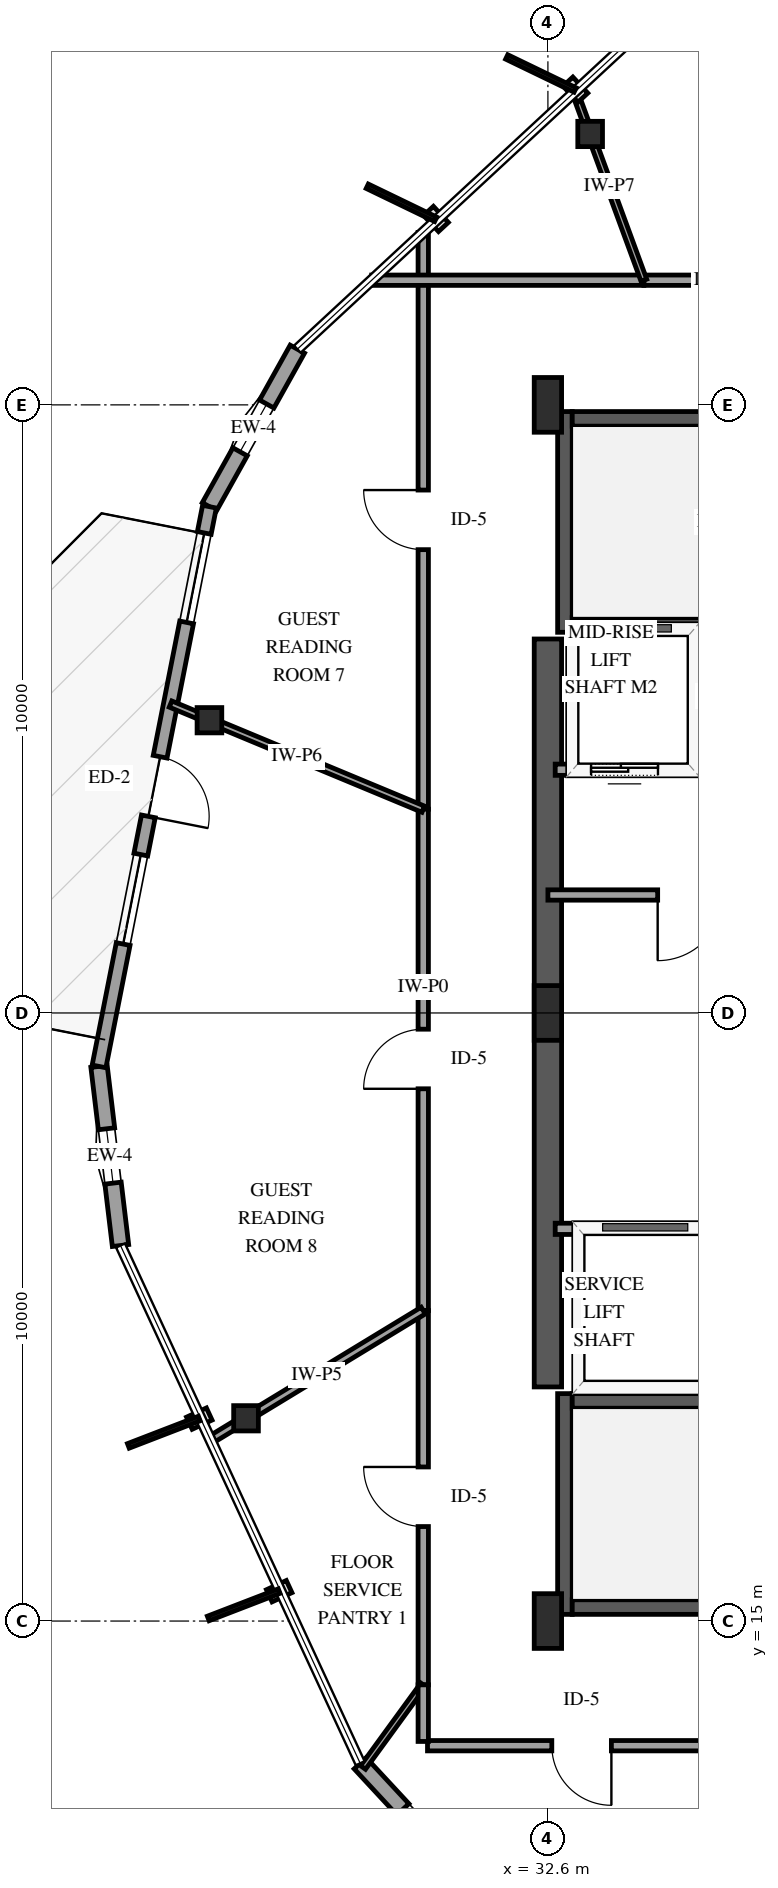
"""IFC4 building model, lengths in metres.
Left out: names, types, materials, properties, quantities, classifications, styles, units other than length and angle.
Written with IfcOpenShell. Run it as: python <this file> out.ifc"""

import sys

from ifc_helpers import new_model, si_unit, direction, frame, frame_2d, origin, origin_2d, place, context, subcontext, project, spatial, rectangle, i_section, extrude, element, fill, save


model = new_model("IFC4")
c1 = context("Model", 3, precision=1e-05, world=origin(), true_north=direction((0.0, 1.0)))
c2 = subcontext(c1, "Body", "Model", "MODEL_VIEW")
j1 = project(units=[si_unit("LENGTHUNIT", "METRE"), si_unit("PLANEANGLEUNIT", "RADIAN")], contexts=[c1])
p1 = place(None, origin())
s1 = spatial("IfcSite", under=j1, at=p1, CompositionType="ELEMENT")
p2 = place(p1, origin())
s2 = spatial("IfcBuilding", under=s1, at=p2, CompositionType="ELEMENT")
p3 = place(p2, frame((0.0, 0.0, 190.6)))
s3 = spatial("IfcBuildingStorey", under=s2, at=p3, CompositionType="ELEMENT", Elevation=190.6)
p4 = place(p3, frame((32.88, 15.11, 0.0), z_axis=(0.0, 0.0, 1.0), x_axis=(0.0, 1.0, 0.0)))
e1 = element("IfcWall", 1, at=p4, inside=s3, PredefinedType="SHEAR", context=c2, shape_type="SweptSolid", body=[
    extrude(rectangle(XDim=3.63, YDim=0.24, at=frame_2d((1.815, 0.0))), origin(), (0.0, 0.0, 1.0), 3.6),
])
for number, where, z_axis, x_axis in (
    (2, (33.0, 15.23, 0.0), (0.0, 0.0, 1.0), (1.0, 0.0, 0.0)),
    (3, (33.0, 18.62, 0.0), (0.0, 0.0, 1.0), (1.0, 0.0, 0.0)),
):
    element("IfcWall", number, at=place(p3, frame(where, z_axis=z_axis, x_axis=x_axis)), inside=s3, PredefinedType="SHEAR", context=c2, shape_type="SweptSolid", body=[
        extrude(rectangle(XDim=8.0, YDim=0.24, at=frame_2d((4.0, 0.0))), origin(), (0.0, 0.0, 1.0), 3.6),
    ])
p5 = place(p3, frame((32.88, 31.26, 0.0), z_axis=(0.0, 0.0, 1.0), x_axis=(0.0, 1.0, 0.0)))
e4 = element("IfcWall", 4, at=p5, inside=s3, PredefinedType="SHEAR", context=c2, shape_type="SweptSolid", body=[
    extrude(rectangle(XDim=3.63, YDim=0.24, at=frame_2d((1.815, 0.0))), origin(), (0.0, 0.0, 1.0), 3.6),
])
for number, where, z_axis, x_axis in (
    (5, (33.0, 31.38, 0.0), (0.0, 0.0, 1.0), (1.0, 0.0, 0.0)),
    (6, (33.0, 34.77, 0.0), (0.0, 0.0, 1.0), (1.0, 0.0, 0.0)),
):
    element("IfcWall", number, at=place(p3, frame(where, z_axis=z_axis, x_axis=x_axis)), inside=s3, PredefinedType="SHEAR", context=c2, shape_type="SweptSolid", body=[
        extrude(rectangle(XDim=8.0, YDim=0.24, at=frame_2d((4.0, 0.0))), origin(), (0.0, 0.0, 1.0), 3.6),
    ])
p6 = place(p3, frame((32.6, 18.85, 0.0), z_axis=(0.0, 0.0, 1.0), x_axis=(0.0, 1.0, 0.0)))
e7 = element("IfcWall", 7, at=p6, inside=s3, PredefinedType="SHEAR", context=c2, shape_type="SweptSolid", body=[
    extrude(rectangle(XDim=12.3, YDim=0.45, at=frame_2d((6.15, 0.0))), origin(), (0.0, 0.0, 1.0), 3.6),
])
for number, where, z_axis, x_axis in (
    (8, (32.6, 15.0, -0.3), (0.0, 0.0, 1.0), (1.0, 0.0, 0.0)),
    (9, (32.6, 25.0, -0.3), (0.0, 0.0, 1.0), (1.0, 0.0, 0.0)),
    (10, (32.6, 35.0, -0.3), (0.0, 0.0, 1.0), (1.0, 0.0, 0.0)),
):
    element("IfcColumn", number, at=place(p3, frame(where, z_axis=z_axis, x_axis=x_axis)), inside=s3, PredefinedType="PILASTER", context=c2, shape_type="SweptSolid", body=[
        extrude(rectangle(XDim=0.45, YDim=0.9, at=origin_2d()), origin(), (0.0, 0.0, 1.0), 3.9),
    ])
for number, where, z_axis, x_axis in (
    (11, (33.295, 39.455, -0.3), (0.0, 0.0, 1.0), (1.0, 0.0, 0.0)),
    (12, (27.034, 29.814, -0.3), (0.0, 0.0, 1.0), (1.0, 0.0, 0.0)),
    (13, (27.635, 18.334, -0.3), (0.0, 0.0, 1.0), (1.0, 0.0, 0.0)),
):
    element("IfcColumn", number, at=place(p3, frame(where, z_axis=z_axis, x_axis=x_axis)), inside=s3, PredefinedType="COLUMN", context=c2, shape_type="SweptSolid", body=[
        extrude(i_section(OverallWidth=0.406, OverallDepth=0.416, WebThickness=0.03, FlangeThickness=0.048, FilletRadius=0.038, at=origin_2d()), origin(), (0.0, 0.0, 1.0), 3.9),
    ])
p7 = place(p3, frame((28.479, 35.917, 0.0), z_axis=(0.0, 0.0, 1.0), x_axis=(-0.48724212473, -0.87326691904, 0.0)))
e14 = element("IfcWall", 14, at=p7, inside=s3, PredefinedType="SOLIDWALL", context=c2, shape_type="SweptSolid", body=[
    extrude(rectangle(XDim=2.967, YDim=0.27, at=frame_2d((1.483, 0.0))), origin(), (0.0, 0.0, 1.0), 2.679),
])
p8 = place(p7, frame((1.033, 0.0, 0.75)))
e15 = element("IfcOpeningElement", 15, at=p8, cuts=e14, PredefinedType="OPENING", context=c2, shape_type="SweptSolid", body=[
    extrude(rectangle(XDim=0.9, YDim=1.5, at=frame_2d((0.45, 0.75))), frame((0.0, 0.145, 0.0), z_axis=(0.0, -1.0, 0.0), x_axis=(1.0, 0.0, 0.0)), (0.0, 0.0, 1.0), 0.29),
])
p9 = place(p3, frame((25.218, 24.121, 0.0), z_axis=(0.0, 0.0, 1.0), x_axis=(0.119080319242, -0.9928846245, 0.0)))
e16 = element("IfcWall", 16, at=p9, inside=s3, PredefinedType="SOLIDWALL", context=c2, shape_type="SweptSolid", body=[
    extrude(rectangle(XDim=2.967, YDim=0.27, at=frame_2d((1.483, 0.0))), origin(), (0.0, 0.0, 1.0), 2.679),
])
p10 = place(p9, frame((1.033, 0.0, 0.75)))
e17 = element("IfcOpeningElement", 17, at=p10, cuts=e16, PredefinedType="OPENING", context=c2, shape_type="SweptSolid", body=[
    extrude(rectangle(XDim=0.9, YDim=1.5, at=frame_2d((0.45, 0.75))), frame((0.0, 0.145, 0.0), z_axis=(0.0, -1.0, 0.0), x_axis=(1.0, 0.0, 0.0)), (0.0, 0.0, 1.0), 0.29),
])
p11 = place(p3, frame((27.034, 33.326, 0.0), z_axis=(0.0, 0.0, 1.0), x_axis=(-0.193553277769, -0.981089765855, 0.0)))
e18 = element("IfcWall", 18, at=p11, inside=s3, PredefinedType="SOLIDWALL", context=c2, shape_type="SweptSolid", body=[
    extrude(rectangle(XDim=9.382, YDim=0.23, at=frame_2d((4.691, 0.0))), origin(), (0.0, 0.0, 1.0), 2.679),
])
p12 = place(p11, frame((4.191, 0.0, 0.0)))
e19 = element("IfcOpeningElement", 19, at=p12, cuts=e18, PredefinedType="OPENING", context=c2, shape_type="SweptSolid", body=[
    extrude(rectangle(XDim=1.0, YDim=2.15, at=frame_2d((0.5, 1.075))), frame((0.0, 0.125, 0.0), z_axis=(0.0, -1.0, 0.0), x_axis=(1.0, 0.0, 0.0)), (0.0, 0.0, 1.0), 0.25),
])
p13 = place(p11, frame((0.44, 0.0, 0.72)))
e20 = element("IfcOpeningElement", 20, at=p13, cuts=e18, PredefinedType="OPENING", context=c2, shape_type="SweptSolid", body=[
    extrude(rectangle(XDim=1.5, YDim=1.7, at=frame_2d((0.75, 0.85))), frame((0.0, 0.125, 0.0), z_axis=(0.0, -1.0, 0.0), x_axis=(1.0, 0.0, 0.0)), (0.0, 0.0, 1.0), 0.25),
])
p14 = place(p11, frame((5.831, 0.0, 0.72)))
e21 = element("IfcOpeningElement", 21, at=p14, cuts=e18, PredefinedType="OPENING", context=c2, shape_type="SweptSolid", body=[
    extrude(rectangle(XDim=1.5, YDim=1.7, at=frame_2d((0.75, 0.85))), frame((0.0, 0.125, 0.0), z_axis=(0.0, -1.0, 0.0), x_axis=(1.0, 0.0, 0.0)), (0.0, 0.0, 1.0), 0.25),
])
p15 = place(p3, frame((29.513, 12.661, 0.0), z_axis=(0.0, 0.0, 1.0), x_axis=(0.679939563614, -0.733268156838, 0.0)))
e22 = element("IfcWall", 22, at=p15, inside=s3, PredefinedType="SOLIDWALL", context=c2, shape_type="SweptSolid", body=[
    extrude(rectangle(XDim=2.967, YDim=0.27, at=frame_2d((1.483, 0.0))), origin(), (0.0, 0.0, 1.0), 2.679),
])
p16 = place(p15, frame((1.033, 0.0, 0.75)))
e23 = element("IfcOpeningElement", 23, at=p16, cuts=e22, PredefinedType="OPENING", context=c2, shape_type="SweptSolid", body=[
    extrude(rectangle(XDim=0.9, YDim=1.5, at=frame_2d((0.45, 0.75))), frame((0.0, 0.145, 0.0), z_axis=(0.0, -1.0, 0.0), x_axis=(1.0, 0.0, 0.0)), (0.0, 0.0, 1.0), 0.29),
])
p17 = place(p3, frame((32.72, 21.45, 0.0), z_axis=(0.0, 0.0, 1.0), x_axis=(1.0, 0.0, 0.0)))
e24 = element("IfcWall", 24, at=p17, inside=s3, PredefinedType="SOLIDWALL", context=c2, shape_type="SweptSolid", body=[
    extrude(rectangle(XDim=2.58, YDim=0.185, at=frame_2d((1.29, 0.0))), origin(), (0.0, 0.0, 1.0), 3.3),
])
p18 = place(p3, frame((32.72, 29.0, 0.0), z_axis=(0.0, 0.0, 1.0), x_axis=(1.0, 0.0, 0.0)))
e25 = element("IfcWall", 25, at=p18, inside=s3, PredefinedType="SOLIDWALL", context=c2, shape_type="SweptSolid", body=[
    extrude(rectangle(XDim=2.28, YDim=0.185, at=frame_2d((1.14, 0.0))), origin(), (0.0, 0.0, 1.0), 3.3),
])
p19 = place(p18, frame((0.59, 0.0, 0.0)))
e26 = element("IfcOpeningElement", 26, at=p19, cuts=e25, PredefinedType="OPENING", context=c2, shape_type="SweptSolid", body=[
    extrude(rectangle(XDim=1.1, YDim=2.15, at=frame_2d((0.55, 1.075))), frame((0.0, 0.103, 0.0), z_axis=(0.0, -1.0, 0.0), x_axis=(1.0, 0.0, 0.0)), (0.0, 0.0, 1.0), 0.205),
])
p20 = place(p3, frame((35.0, 29.11, 0.0), z_axis=(0.0, 0.0, 1.0), x_axis=(0.0, 1.0, 0.0)))
e27 = element("IfcWall", 27, at=p20, inside=s3, PredefinedType="SOLIDWALL", context=c2, shape_type="SweptSolid", body=[
    extrude(rectangle(XDim=2.1, YDim=0.185, at=frame_2d((1.05, 0.0))), origin(), (0.0, 0.0, 1.0), 3.3),
])
p21 = place(p3, frame((30.55, 28.351, 0.0), z_axis=(0.0, 0.0, 1.0), x_axis=(0.0, 1.0, 0.0)))
e28 = element("IfcWall", 28, at=p21, inside=s3, PredefinedType="PARTITIONING", context=c2, shape_type="SweptSolid", body=[
    extrude(rectangle(XDim=9.485, YDim=0.17, at=frame_2d((4.742, 0.0))), origin(), (0.0, 0.0, 1.0), 3.3),
])
p22 = place(p21, frame((4.268, 0.0, 0.0)))
e29 = element("IfcOpeningElement", 29, at=p22, cuts=e28, PredefinedType="OPENING", context=c2, shape_type="SweptSolid", body=[
    extrude(rectangle(XDim=0.98, YDim=2.15, at=frame_2d((0.49, 1.075))), frame((0.0, 0.095, 0.0), z_axis=(0.0, -1.0, 0.0), x_axis=(1.0, 0.0, 0.0)), (0.0, 0.0, 1.0), 0.19),
])
p23 = place(p3, frame((30.55, 20.106, 0.0), z_axis=(0.0, 0.0, 1.0), x_axis=(0.0, 1.0, 0.0)))
e30 = element("IfcWall", 30, at=p23, inside=s3, PredefinedType="PARTITIONING", context=c2, shape_type="SweptSolid", body=[
    extrude(rectangle(XDim=8.245, YDim=0.17, at=frame_2d((4.123, 0.0))), origin(), (0.0, 0.0, 1.0), 3.3),
])
p24 = place(p23, frame((3.647, 0.0, 0.0)))
e31 = element("IfcOpeningElement", 31, at=p24, cuts=e30, PredefinedType="OPENING", context=c2, shape_type="SweptSolid", body=[
    extrude(rectangle(XDim=0.98, YDim=2.15, at=frame_2d((0.49, 1.075))), frame((0.0, 0.095, 0.0), z_axis=(0.0, -1.0, 0.0), x_axis=(1.0, 0.0, 0.0)), (0.0, 0.0, 1.0), 0.19),
])
p25 = place(p3, frame((34.178, 37.05, 0.0), z_axis=(0.0, 0.0, 1.0), x_axis=(1.0, 0.0, 0.0)))
e32 = element("IfcWall", 32, at=p25, inside=s3, PredefinedType="PARTITIONING", context=c2, shape_type="SweptSolid", body=[
    extrude(rectangle(XDim=6.952, YDim=0.17, at=frame_2d((3.476, 0.0))), origin(), (0.0, 0.0, 1.0), 3.3),
])
p26 = place(p25, frame((3.001, 0.0, 0.0)))
e33 = element("IfcOpeningElement", 33, at=p26, cuts=e32, PredefinedType="OPENING", context=c2, shape_type="SweptSolid", body=[
    extrude(rectangle(XDim=0.98, YDim=2.15, at=frame_2d((0.49, 1.075))), frame((0.0, 0.095, 0.0), z_axis=(0.0, -1.0, 0.0), x_axis=(1.0, 0.0, 0.0)), (0.0, 0.0, 1.0), 0.19),
])
p27 = place(p3, frame((30.55, 13.951, 0.0), z_axis=(0.0, 0.0, 1.0), x_axis=(0.0, 1.0, 0.0)))
e34 = element("IfcWall", 34, at=p27, inside=s3, PredefinedType="PARTITIONING", context=c2, shape_type="SweptSolid", body=[
    extrude(rectangle(XDim=6.155, YDim=0.17, at=frame_2d((3.078, 0.0))), origin(), (0.0, 0.0, 1.0), 3.3),
])
p28 = place(p27, frame((2.603, 0.0, 0.0)))
e35 = element("IfcOpeningElement", 35, at=p28, cuts=e34, PredefinedType="OPENING", context=c2, shape_type="SweptSolid", body=[
    extrude(rectangle(XDim=0.98, YDim=2.15, at=frame_2d((0.49, 1.075))), frame((0.0, 0.095, 0.0), z_axis=(0.0, -1.0, 0.0), x_axis=(1.0, 0.0, 0.0)), (0.0, 0.0, 1.0), 0.19),
])
p29 = place(p3, frame((35.719, 12.95, 0.0), z_axis=(0.0, 0.0, 1.0), x_axis=(-1.0, 0.0, 0.0)))
e36 = element("IfcWall", 36, at=p29, inside=s3, PredefinedType="PARTITIONING", context=c2, shape_type="SweptSolid", body=[
    extrude(rectangle(XDim=5.099, YDim=0.17, at=frame_2d((2.549, 0.0))), origin(), (0.0, 0.0, 1.0), 3.3),
])
p30 = place(p29, frame((2.075, 0.0, 0.0)))
e37 = element("IfcOpeningElement", 37, at=p30, cuts=e36, PredefinedType="OPENING", context=c2, shape_type="SweptSolid", body=[
    extrude(rectangle(XDim=0.98, YDim=2.15, at=frame_2d((0.49, 1.075))), frame((0.0, 0.095, 0.0), z_axis=(0.0, -1.0, 0.0), x_axis=(1.0, 0.0, 0.0)), (0.0, 0.0, 1.0), 0.19),
])
p31 = place(p3, frame((37.29, 26.94, 0.0), z_axis=(0.0, 0.0, 1.0), x_axis=(-1.0, 0.0, 0.0)))
e38 = element("IfcWall", 38, at=p31, inside=s3, PredefinedType="PARTITIONING", context=c2, shape_type="SweptSolid", body=[
    extrude(rectangle(XDim=4.69, YDim=0.17, at=frame_2d((2.345, 0.0))), origin(), (0.0, 0.0, 1.0), 3.3),
])
p32 = place(p31, frame((1.805, 0.0, 0.0)))
e39 = element("IfcOpeningElement", 39, at=p32, cuts=e38, PredefinedType="OPENING", context=c2, shape_type="SweptSolid", body=[
    extrude(rectangle(XDim=1.08, YDim=2.15, at=frame_2d((0.54, 1.075))), frame((0.0, 0.095, 0.0), z_axis=(0.0, -1.0, 0.0), x_axis=(1.0, 0.0, 0.0)), (0.0, 0.0, 1.0), 0.19),
])
p33 = place(p3, frame((30.55, 28.351, 0.0), z_axis=(0.0, 0.0, 1.0), x_axis=(-0.9232869961, 0.384110821029, 0.0)))
e40 = element("IfcWall", 40, at=p33, inside=s3, PredefinedType="PARTITIONING", context=c2, shape_type="SweptSolid", body=[
    extrude(rectangle(XDim=4.501, YDim=0.11, at=frame_2d((2.25, 0.0))), origin(), (0.0, 0.0, 1.0), 3.3),
])
p34 = place(p3, frame((29.702, 37.05, 0.0), z_axis=(0.0, 0.0, 1.0), x_axis=(1.0, 0.0, 0.0)))
e41 = element("IfcWall", 41, at=p34, inside=s3, PredefinedType="PARTITIONING", context=c2, shape_type="SweptSolid", body=[
    extrude(rectangle(XDim=4.476, YDim=0.17, at=frame_2d((2.238, 0.0))), origin(), (0.0, 0.0, 1.0), 3.3),
])
p35 = place(p3, frame((35.719, 12.95, 0.0), z_axis=(0.0, 0.0, 1.0), x_axis=(-0.232789903954, -0.972527048784, 0.0)))
e42 = element("IfcWall", 42, at=p35, inside=s3, PredefinedType="PARTITIONING", context=c2, shape_type="SweptSolid", body=[
    extrude(rectangle(XDim=4.355, YDim=0.14, at=frame_2d((2.178, 0.0))), origin(), (0.0, 0.0, 1.0), 2.595),
])
p36 = place(p3, frame((30.55, 20.106, 0.0), z_axis=(0.0, 0.0, 1.0), x_axis=(-0.854511563414, -0.519432370951, 0.0)))
e43 = element("IfcWall", 43, at=p36, inside=s3, PredefinedType="PARTITIONING", context=c2, shape_type="SweptSolid", body=[
    extrude(rectangle(XDim=4.095, YDim=0.13, at=frame_2d((2.047, 0.0))), origin(), (0.0, 0.0, 1.0), 3.3),
])
p37 = place(p3, frame((34.178, 37.05, 0.0), z_axis=(0.0, 0.0, 1.0), x_axis=(-0.344730941126, 0.938701538419, 0.0)))
e44 = element("IfcWall", 44, at=p37, inside=s3, PredefinedType="PARTITIONING", context=c2, shape_type="SweptSolid", body=[
    extrude(rectangle(XDim=3.298, YDim=0.1, at=frame_2d((1.649, 0.0))), origin(), (0.0, 0.0, 1.0), 2.595),
])
p38 = place(p3, frame((30.55, 13.951, 0.0), z_axis=(0.0, 0.0, 1.0), x_axis=(-0.588836336306, -0.808252292942, 0.0)))
e45 = element("IfcWall", 45, at=p38, inside=s3, PredefinedType="PARTITIONING", context=c2, shape_type="SweptSolid", body=[
    extrude(rectangle(XDim=1.681, YDim=0.1, at=frame_2d((0.841, 0.0))), origin(), (0.0, 0.0, 1.0), 3.3),
])
p39 = place(p3, frame((30.55, 13.02, 0.0), z_axis=(0.0, 0.0, 1.0), x_axis=(0.0, 1.0, 0.0)))
e46 = element("IfcWall", 46, at=p39, inside=s3, PredefinedType="PARTITIONING", context=c2, shape_type="SweptSolid", body=[
    extrude(rectangle(XDim=0.931, YDim=0.17, at=frame_2d((0.465, 0.0))), origin(), (0.0, 0.0, 1.0), 3.3),
])
p40 = place(p8, origin())
e47 = element("IfcWindow", 47, at=p40, inside=s3, PartitioningType="SINGLE_PANEL", PredefinedType="WINDOW", context=c2, shape_type="SweptSolid", body=[
    extrude(rectangle(XDim=0.9, YDim=1.5, at=frame_2d((0.45, 0.75))), frame((0.0, 0.03, 0.0), z_axis=(0.0, -1.0, 0.0), x_axis=(1.0, 0.0, 0.0)), (0.0, 0.0, 1.0), 0.06),
])
fill(e15, e47)
p41 = place(p10, origin())
e48 = element("IfcWindow", 48, at=p41, inside=s3, PartitioningType="SINGLE_PANEL", PredefinedType="WINDOW", context=c2, shape_type="SweptSolid", body=[
    extrude(rectangle(XDim=0.9, YDim=1.5, at=frame_2d((0.45, 0.75))), frame((0.0, 0.03, 0.0), z_axis=(0.0, -1.0, 0.0), x_axis=(1.0, 0.0, 0.0)), (0.0, 0.0, 1.0), 0.06),
])
fill(e17, e48)
p42 = place(p12, origin())
e49 = element("IfcDoor", 49, at=p42, inside=s3, OperationType="SINGLE_SWING_RIGHT", PredefinedType="DOOR", context=c2, shape_type="SweptSolid", body=[
    extrude(rectangle(XDim=1.0, YDim=2.15, at=frame_2d((0.5, 1.075))), frame((0.0, 0.025, 0.0), z_axis=(0.0, -1.0, 0.0), x_axis=(1.0, 0.0, 0.0)), (0.0, 0.0, 1.0), 0.05),
])
fill(e19, e49)
p43 = place(p13, origin())
e50 = element("IfcWindow", 50, at=p43, inside=s3, PartitioningType="SINGLE_PANEL", PredefinedType="WINDOW", context=c2, shape_type="SweptSolid", body=[
    extrude(rectangle(XDim=1.5, YDim=1.7, at=frame_2d((0.75, 0.85))), frame((0.0, 0.03, 0.0), z_axis=(0.0, -1.0, 0.0), x_axis=(1.0, 0.0, 0.0)), (0.0, 0.0, 1.0), 0.06),
])
fill(e20, e50)
p44 = place(p14, origin())
e51 = element("IfcWindow", 51, at=p44, inside=s3, PartitioningType="SINGLE_PANEL", PredefinedType="WINDOW", context=c2, shape_type="SweptSolid", body=[
    extrude(rectangle(XDim=1.5, YDim=1.7, at=frame_2d((0.75, 0.85))), frame((0.0, 0.03, 0.0), z_axis=(0.0, -1.0, 0.0), x_axis=(1.0, 0.0, 0.0)), (0.0, 0.0, 1.0), 0.06),
])
fill(e21, e51)
p45 = place(p16, origin())
e52 = element("IfcWindow", 52, at=p45, inside=s3, PartitioningType="SINGLE_PANEL", PredefinedType="WINDOW", context=c2, shape_type="SweptSolid", body=[
    extrude(rectangle(XDim=0.9, YDim=1.5, at=frame_2d((0.45, 0.75))), frame((0.0, 0.03, 0.0), z_axis=(0.0, -1.0, 0.0), x_axis=(1.0, 0.0, 0.0)), (0.0, 0.0, 1.0), 0.06),
])
fill(e23, e52)
p46 = place(p19, origin())
e53 = element("IfcDoor", 53, at=p46, inside=s3, OperationType="SLIDING_TO_LEFT", PredefinedType="DOOR", context=c2, shape_type="SweptSolid", body=[
    extrude(rectangle(XDim=1.1, YDim=2.15, at=frame_2d((0.55, 1.075))), frame((0.0, 0.025, 0.0), z_axis=(0.0, -1.0, 0.0), x_axis=(1.0, 0.0, 0.0)), (0.0, 0.0, 1.0), 0.05),
])
fill(e26, e53)
p47 = place(p22, origin())
e54 = element("IfcDoor", 54, at=p47, inside=s3, OperationType="SINGLE_SWING_RIGHT", PredefinedType="DOOR", context=c2, shape_type="SweptSolid", body=[
    extrude(rectangle(XDim=0.98, YDim=2.15, at=frame_2d((0.49, 1.075))), frame((0.0, 0.025, 0.0), z_axis=(0.0, -1.0, 0.0), x_axis=(1.0, 0.0, 0.0)), (0.0, 0.0, 1.0), 0.05),
])
fill(e29, e54)
p48 = place(p24, origin())
e55 = element("IfcDoor", 55, at=p48, inside=s3, OperationType="SINGLE_SWING_LEFT", PredefinedType="DOOR", context=c2, shape_type="SweptSolid", body=[
    extrude(rectangle(XDim=0.98, YDim=2.15, at=frame_2d((0.49, 1.075))), frame((0.0, 0.025, 0.0), z_axis=(0.0, -1.0, 0.0), x_axis=(1.0, 0.0, 0.0)), (0.0, 0.0, 1.0), 0.05),
])
fill(e31, e55)
p49 = place(p28, origin())
e56 = element("IfcDoor", 56, at=p49, inside=s3, OperationType="SINGLE_SWING_RIGHT", PredefinedType="DOOR", context=c2, shape_type="SweptSolid", body=[
    extrude(rectangle(XDim=0.98, YDim=2.15, at=frame_2d((0.49, 1.075))), frame((0.0, 0.025, 0.0), z_axis=(0.0, -1.0, 0.0), x_axis=(1.0, 0.0, 0.0)), (0.0, 0.0, 1.0), 0.05),
])
fill(e35, e56)
p50 = place(p30, origin())
e57 = element("IfcDoor", 57, at=p50, inside=s3, OperationType="SINGLE_SWING_LEFT", PredefinedType="DOOR", context=c2, shape_type="SweptSolid", body=[
    extrude(rectangle(XDim=0.98, YDim=2.15, at=frame_2d((0.49, 1.075))), frame((0.0, 0.025, 0.0), z_axis=(0.0, -1.0, 0.0), x_axis=(1.0, 0.0, 0.0)), (0.0, 0.0, 1.0), 0.05),
])
fill(e37, e57)
p51 = place(p32, origin())
e58 = element("IfcDoor", 58, at=p51, inside=s3, OperationType="SINGLE_SWING_RIGHT", PredefinedType="DOOR", context=c2, shape_type="SweptSolid", body=[
    extrude(rectangle(XDim=1.08, YDim=2.15, at=frame_2d((0.54, 1.075))), frame((0.0, 0.025, 0.0), z_axis=(0.0, -1.0, 0.0), x_axis=(1.0, 0.0, 0.0)), (0.0, 0.0, 1.0), 0.05),
])
fill(e39, e58)
save(model, sys.argv[1])
